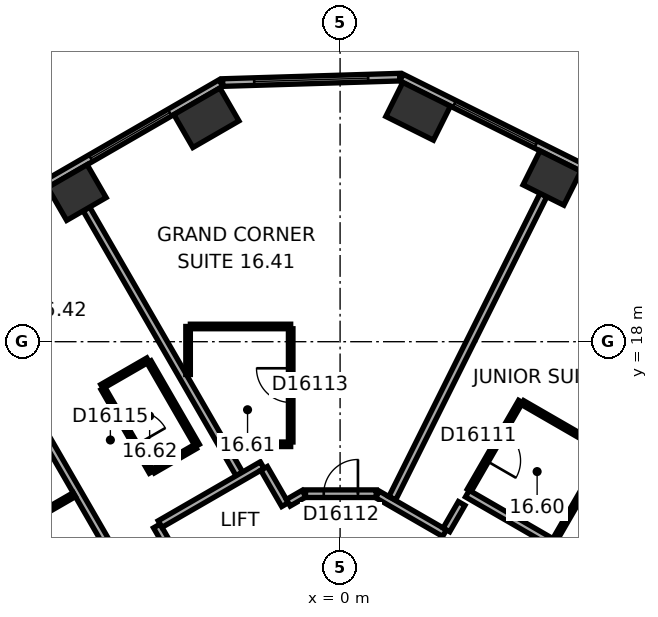
"""IFC4 building model, lengths in metres.
Left out: names, types, materials, properties, quantities, classifications, styles, units other than length and angle.
Written with IfcOpenShell. Run it as: python <this file> out.ifc"""

import sys

from ifc_helpers import new_model, si_unit, direction, frame, frame_2d, origin, origin_2d, place, context, subcontext, project, spatial, rectangle, extrude, element, fill, save


model = new_model("IFC4")
c1 = context("Model", 3, precision=1e-05, world=origin(), true_north=direction((0.0, 1.0)))
c2 = subcontext(c1, "Body", "Model", "MODEL_VIEW")
j1 = project(units=[si_unit("LENGTHUNIT", "METRE"), si_unit("PLANEANGLEUNIT", "RADIAN")], contexts=[c1])
p1 = place(None, origin())
s1 = spatial("IfcSite", under=j1, at=p1, CompositionType="ELEMENT")
p2 = place(p1, origin())
s2 = spatial("IfcBuilding", under=s1, at=p2, CompositionType="ELEMENT")
p3 = place(p2, frame((0.0, 0.0, 73.7)))
s3 = spatial("IfcBuildingStorey", under=s2, at=p3, CompositionType="ELEMENT", Elevation=73.7)
p4 = place(p3, frame((5.574, 22.306, 0.0), z_axis=(0.0, 0.0, 1.0), x_axis=(-0.894934361602, 0.44619781311, 0.0)))
e1 = element("IfcColumn", 1, at=p4, inside=s3, PredefinedType="COLUMN", context=c2, shape_type="SweptSolid", body=[
    extrude(rectangle(XDim=1.2, YDim=1.0, at=origin_2d()), origin(), (0.0, 0.0, 1.0), 3.3),
])
for number, where, z_axis, x_axis in (
    (2, (2.053, 24.062, 0.0), (0.0, 0.0, 1.0), (-0.895, 0.446, 0.0)),
    (3, (-3.518, 23.892, 0.0), (0.0, 0.0, 1.0), (-0.866, -0.5, 0.0)),
):
    element("IfcColumn", number, at=place(p3, frame(where, z_axis=z_axis, x_axis=x_axis)), inside=s3, PredefinedType="COLUMN", context=c2, shape_type="SweptSolid", body=[
        extrude(rectangle(XDim=1.4, YDim=1.0, at=origin_2d()), origin(), (0.0, 0.0, 1.0), 3.3),
    ])
p5 = place(p3, frame((-6.926, 21.925, 0.0), z_axis=(0.0, 0.0, 1.0), x_axis=(-0.866025403784, -0.5, 0.0)))
e4 = element("IfcColumn", 4, at=p5, inside=s3, PredefinedType="COLUMN", context=c2, shape_type="SweptSolid", body=[
    extrude(rectangle(XDim=1.2, YDim=1.0, at=origin_2d()), origin(), (0.0, 0.0, 1.0), 3.3),
])
p6 = place(p3, frame((20.63, 15.47, 0.0), z_axis=(0.0, 0.0, 1.0), x_axis=(-0.894934518609, 0.446197498203, 0.0)))
e5 = element("IfcWall", 5, at=p6, inside=s3, PredefinedType="STANDARD", context=c2, shape_type="SweptSolid", body=[
    extrude(rectangle(XDim=21.246, YDim=0.2, at=frame_2d((10.623, 0.0))), origin(), (0.0, 0.0, 1.0), 3.3),
])
p7 = place(p6, frame((1.553, 0.0, 0.8)))
e6 = element("IfcOpeningElement", 6, at=p7, cuts=e5, PredefinedType="OPENING", context=c2, shape_type="SweptSolid", body=[
    extrude(rectangle(XDim=2.4, YDim=1.7, at=frame_2d((1.2, 0.85))), frame((0.0, 0.11, 0.0), z_axis=(0.0, -1.0, 0.0), x_axis=(1.0, 0.0, 0.0)), (0.0, 0.0, 1.0), 0.22),
])
p8 = place(p6, frame((5.488, 0.0, 0.8)))
e7 = element("IfcOpeningElement", 7, at=p8, cuts=e5, PredefinedType="OPENING", context=c2, shape_type="SweptSolid", body=[
    extrude(rectangle(XDim=2.4, YDim=1.7, at=frame_2d((1.2, 0.85))), frame((0.0, 0.11, 0.0), z_axis=(0.0, -1.0, 0.0), x_axis=(1.0, 0.0, 0.0)), (0.0, 0.0, 1.0), 0.22),
])
p9 = place(p6, frame((9.422, 0.0, 0.8)))
e8 = element("IfcOpeningElement", 8, at=p9, cuts=e5, PredefinedType="OPENING", context=c2, shape_type="SweptSolid", body=[
    extrude(rectangle(XDim=2.4, YDim=1.7, at=frame_2d((1.2, 0.85))), frame((0.0, 0.11, 0.0), z_axis=(0.0, -1.0, 0.0), x_axis=(1.0, 0.0, 0.0)), (0.0, 0.0, 1.0), 0.22),
])
p10 = place(p6, frame((13.357, 0.0, 0.8)))
e9 = element("IfcOpeningElement", 9, at=p10, cuts=e5, PredefinedType="OPENING", context=c2, shape_type="SweptSolid", body=[
    extrude(rectangle(XDim=2.4, YDim=1.7, at=frame_2d((1.2, 0.85))), frame((0.0, 0.11, 0.0), z_axis=(0.0, -1.0, 0.0), x_axis=(1.0, 0.0, 0.0)), (0.0, 0.0, 1.0), 0.22),
])
p11 = place(p6, frame((17.292, 0.0, 0.8)))
e10 = element("IfcOpeningElement", 10, at=p11, cuts=e5, PredefinedType="OPENING", context=c2, shape_type="SweptSolid", body=[
    extrude(rectangle(XDim=2.4, YDim=1.7, at=frame_2d((1.2, 0.85))), frame((0.0, 0.11, 0.0), z_axis=(0.0, -1.0, 0.0), x_axis=(1.0, 0.0, 0.0)), (0.0, 0.0, 1.0), 0.22),
])
p12 = place(p3, frame((1.568, 24.961, 0.0), z_axis=(0.0, 0.0, 1.0), x_axis=(-0.999533359013, -0.030546099927, 0.0)))
e11 = element("IfcWall", 11, at=p12, inside=s3, PredefinedType="STANDARD", context=c2, shape_type="SweptSolid", body=[
    extrude(rectangle(XDim=4.66, YDim=0.2, at=frame_2d((2.33, 0.0))), origin(), (0.0, 0.0, 1.0), 3.3),
])
p13 = place(p12, frame((0.83, 0.0, 0.8)))
e12 = element("IfcOpeningElement", 12, at=p13, cuts=e11, PredefinedType="OPENING", context=c2, shape_type="SweptSolid", body=[
    extrude(rectangle(XDim=3.0, YDim=1.7, at=frame_2d((1.5, 0.85))), frame((0.0, 0.11, 0.0), z_axis=(0.0, -1.0, 0.0), x_axis=(1.0, 0.0, 0.0)), (0.0, 0.0, 1.0), 0.22),
])
p14 = place(p3, frame((-3.136, 24.805, 0.0), z_axis=(0.0, 0.0, 1.0), x_axis=(-0.866028291626, -0.499994998079, 0.0)))
e13 = element("IfcWall", 13, at=p14, inside=s3, PredefinedType="STANDARD", context=c2, shape_type="SweptSolid", body=[
    extrude(rectangle(XDim=21.246, YDim=0.2, at=frame_2d((10.623, 0.0))), origin(), (0.0, 0.0, 1.0), 3.3),
])
p15 = place(p14, frame((1.555, 0.0, 0.8)))
e14 = element("IfcOpeningElement", 14, at=p15, cuts=e13, PredefinedType="OPENING", context=c2, shape_type="SweptSolid", body=[
    extrude(rectangle(XDim=2.4, YDim=1.7, at=frame_2d((1.2, 0.85))), frame((0.0, 0.11, 0.0), z_axis=(0.0, -1.0, 0.0), x_axis=(1.0, 0.0, 0.0)), (0.0, 0.0, 1.0), 0.22),
])
p16 = place(p14, frame((5.489, 0.0, 0.8)))
e15 = element("IfcOpeningElement", 15, at=p16, cuts=e13, PredefinedType="OPENING", context=c2, shape_type="SweptSolid", body=[
    extrude(rectangle(XDim=2.4, YDim=1.7, at=frame_2d((1.2, 0.85))), frame((0.0, 0.11, 0.0), z_axis=(0.0, -1.0, 0.0), x_axis=(1.0, 0.0, 0.0)), (0.0, 0.0, 1.0), 0.22),
])
p17 = place(p14, frame((9.424, 0.0, 0.8)))
e16 = element("IfcOpeningElement", 16, at=p17, cuts=e13, PredefinedType="OPENING", context=c2, shape_type="SweptSolid", body=[
    extrude(rectangle(XDim=2.4, YDim=1.7, at=frame_2d((1.2, 0.85))), frame((0.0, 0.11, 0.0), z_axis=(0.0, -1.0, 0.0), x_axis=(1.0, 0.0, 0.0)), (0.0, 0.0, 1.0), 0.22),
])
p18 = place(p14, frame((13.358, 0.0, 0.8)))
e17 = element("IfcOpeningElement", 17, at=p18, cuts=e13, PredefinedType="OPENING", context=c2, shape_type="SweptSolid", body=[
    extrude(rectangle(XDim=2.4, YDim=1.7, at=frame_2d((1.2, 0.85))), frame((0.0, 0.11, 0.0), z_axis=(0.0, -1.0, 0.0), x_axis=(1.0, 0.0, 0.0)), (0.0, 0.0, 1.0), 0.22),
])
p19 = place(p14, frame((17.293, 0.0, 0.8)))
e18 = element("IfcOpeningElement", 18, at=p19, cuts=e13, PredefinedType="OPENING", context=c2, shape_type="SweptSolid", body=[
    extrude(rectangle(XDim=2.4, YDim=1.7, at=frame_2d((1.2, 0.85))), frame((0.0, 0.11, 0.0), z_axis=(0.0, -1.0, 0.0), x_axis=(1.0, 0.0, 0.0)), (0.0, 0.0, 1.0), 0.22),
])
p20 = place(p3, frame((-10.083, 19.524, 0.0), z_axis=(0.0, 0.0, 1.0), x_axis=(0.499999662836, -0.866025598446, 0.0)))
e19 = element("IfcWall", 19, at=p20, inside=s3, PredefinedType="PARTITIONING", context=c2, shape_type="SweptSolid", body=[
    extrude(rectangle(XDim=9.25, YDim=0.2, at=frame_2d((4.625, 0.0))), origin(), (0.0, 0.0, 1.0), 2.15),
])
p21 = place(p3, frame((-9.016, 12.808, 0.0), z_axis=(0.0, 0.0, 1.0), x_axis=(0.86600796803, 0.500030198396, 0.0)))
e20 = element("IfcWall", 20, at=p21, inside=s3, PredefinedType="PARTITIONING", context=c2, shape_type="SweptSolid", body=[
    extrude(rectangle(XDim=2.335, YDim=0.12, at=frame_2d((1.167, 0.0))), origin(), (0.0, 0.0, 1.0), 2.95),
])
p22 = place(p3, frame((-6.676, 21.492, 0.0), z_axis=(0.0, 0.0, 1.0), x_axis=(0.500011263043, -0.866018900966, 0.0)))
e21 = element("IfcWall", 21, at=p22, inside=s3, PredefinedType="PARTITIONING", context=c2, shape_type="SweptSolid", body=[
    extrude(rectangle(XDim=8.049, YDim=0.2, at=frame_2d((4.024, 0.0))), origin(), (0.0, 0.0, 1.0), 2.95),
])
p23 = place(p3, frame((-6.268, 16.82, 0.0), z_axis=(0.0, 0.0, 1.0), x_axis=(0.866002662425, 0.500039387122, 0.0)))
e22 = element("IfcWall", 22, at=p23, inside=s3, PredefinedType="PARTITIONING", context=c2, shape_type="SweptSolid", body=[
    extrude(rectangle(XDim=1.4, YDim=0.12, at=frame_2d((0.7, 0.0))), origin(), (0.0, 0.0, 1.0), 2.95),
])
p24 = place(p3, frame((-5.026, 17.469, 0.0), z_axis=(0.0, 0.0, 1.0), x_axis=(0.500005339912, -0.866022320763, 0.0)))
e23 = element("IfcWall", 23, at=p24, inside=s3, PredefinedType="PARTITIONING", context=c2, shape_type="SweptSolid", body=[
    extrude(rectangle(XDim=2.54, YDim=0.12, at=frame_2d((1.27, 0.0))), origin(), (0.0, 0.0, 1.0), 2.95),
])
p25 = place(p3, frame((-4.968, 14.569, 0.0), z_axis=(0.0, 0.0, 1.0), x_axis=(-0.500046963369, 0.865998287773, 0.0)))
e24 = element("IfcWall", 24, at=p25, inside=s3, PredefinedType="PARTITIONING", context=c2, shape_type="SweptSolid", body=[
    extrude(rectangle(XDim=2.54, YDim=0.12, at=frame_2d((1.27, 0.0))), origin(), (0.0, 0.0, 1.0), 2.95),
])
p26 = place(p25, frame((0.82, 0.0, 0.0)))
e25 = element("IfcOpeningElement", 25, at=p26, cuts=e24, PredefinedType="OPENING", context=c2, shape_type="SweptSolid", body=[
    extrude(rectangle(XDim=0.9, YDim=2.1, at=frame_2d((0.45, 1.05))), frame((0.0, 0.07, 0.0), z_axis=(0.0, -1.0, 0.0), x_axis=(1.0, 0.0, 0.0)), (0.0, 0.0, 1.0), 0.14),
])
p27 = place(p3, frame((-4.823, 13.152, 0.0), z_axis=(0.0, 0.0, 1.0), x_axis=(0.499986357472, -0.866033280158, 0.0)))
e26 = element("IfcWall", 26, at=p27, inside=s3, PredefinedType="PARTITIONING", context=c2, shape_type="SweptSolid", body=[
    extrude(rectangle(XDim=1.201, YDim=0.2, at=frame_2d((0.601, 0.0))), origin(), (0.0, 0.0, 1.0), 2.95),
])
p28 = place(p3, frame((-4.0, 17.137, 0.0), z_axis=(0.0, 0.0, 1.0), x_axis=(0.0, 1.0, 0.0)))
e27 = element("IfcWall", 27, at=p28, inside=s3, PredefinedType="PARTITIONING", context=c2, shape_type="SweptSolid", body=[
    extrude(rectangle(XDim=1.263, YDim=0.12, at=frame_2d((0.632, 0.0))), origin(), (0.0, 0.0, 1.0), 2.95),
])
p29 = place(p3, frame((-3.94, 18.401, 0.0), z_axis=(0.0, 0.0, 1.0), x_axis=(1.0, 0.0, 0.0)))
e28 = element("IfcWall", 28, at=p29, inside=s3, PredefinedType="PARTITIONING", context=c2, shape_type="SweptSolid", body=[
    extrude(rectangle(XDim=2.64, YDim=0.12, at=frame_2d((1.32, 0.0))), origin(), (0.0, 0.0, 1.0), 2.95),
])
p30 = place(p3, frame((-3.808, 15.239, 0.0), z_axis=(0.0, 0.0, 1.0), x_axis=(-0.866087136806, -0.499893060024, 0.0)))
e29 = element("IfcWall", 29, at=p30, inside=s3, PredefinedType="PARTITIONING", context=c2, shape_type="SweptSolid", body=[
    extrude(rectangle(XDim=1.28, YDim=0.12, at=frame_2d((0.64, 0.0))), origin(), (0.0, 0.0, 1.0), 2.95),
])
p31 = place(p3, frame((-2.05, 14.752, 0.0), z_axis=(0.0, 0.0, 1.0), x_axis=(-0.866030936828, -0.499990416364, 0.0)))
e30 = element("IfcWall", 30, at=p31, inside=s3, PredefinedType="PARTITIONING", context=c2, shape_type="SweptSolid", body=[
    extrude(rectangle(XDim=3.102, YDim=0.2, at=frame_2d((1.551, 0.0))), origin(), (0.0, 0.0, 1.0), 2.95),
])
p32 = place(p3, frame((-1.449, 13.712, 0.0), z_axis=(0.0, 0.0, 1.0), x_axis=(-0.499978356969, 0.866037899034, 0.0)))
e31 = element("IfcWall", 31, at=p32, inside=s3, PredefinedType="PARTITIONING", context=c2, shape_type="SweptSolid", body=[
    extrude(rectangle(XDim=1.101, YDim=0.2, at=frame_2d((0.551, 0.0))), origin(), (0.0, 0.0, 1.0), 2.95),
])
p33 = place(p3, frame((-1.3, 15.301, 0.0), z_axis=(0.0, 0.0, 1.0), x_axis=(-1.0, 0.0, 0.0)))
e32 = element("IfcWall", 32, at=p33, inside=s3, PredefinedType="PARTITIONING", context=c2, shape_type="SweptSolid", body=[
    extrude(rectangle(XDim=1.661, YDim=0.12, at=frame_2d((0.831, 0.0))), origin(), (0.0, 0.0, 1.0), 2.95),
])
p34 = place(p3, frame((-1.3, 18.341, 0.0), z_axis=(0.0, 0.0, 1.0), x_axis=(0.0, -1.0, 0.0)))
e33 = element("IfcWall", 33, at=p34, inside=s3, PredefinedType="PARTITIONING", context=c2, shape_type="SweptSolid", body=[
    extrude(rectangle(XDim=2.98, YDim=0.12, at=frame_2d((1.49, 0.0))), origin(), (0.0, 0.0, 1.0), 2.95),
])
p35 = place(p34, frame((1.04, 0.0, 0.0)))
e34 = element("IfcOpeningElement", 34, at=p35, cuts=e33, PredefinedType="OPENING", context=c2, shape_type="SweptSolid", body=[
    extrude(rectangle(XDim=0.9, YDim=2.1, at=frame_2d((0.45, 1.05))), frame((0.0, 0.07, 0.0), z_axis=(0.0, -1.0, 0.0), x_axis=(1.0, 0.0, 0.0)), (0.0, 0.0, 1.0), 0.14),
])
p36 = place(p3, frame((-0.95, 14.001, 0.0), z_axis=(0.0, 0.0, 1.0), x_axis=(-0.86609177584, -0.499885022602, 0.0)))
e35 = element("IfcWall", 35, at=p36, inside=s3, PredefinedType="PARTITIONING", context=c2, shape_type="SweptSolid", body=[
    extrude(rectangle(XDim=0.477, YDim=0.2, at=frame_2d((0.238, 0.0))), origin(), (0.0, 0.0, 1.0), 2.95),
])
p37 = place(p3, frame((0.95, 14.001, 0.0), z_axis=(0.0, 0.0, 1.0), x_axis=(-1.0, 0.0, 0.0)))
e36 = element("IfcWall", 36, at=p37, inside=s3, PredefinedType="PARTITIONING", context=c2, shape_type="SweptSolid", body=[
    extrude(rectangle(XDim=1.86, YDim=0.2, at=frame_2d((0.93, 0.0))), origin(), (0.0, 0.0, 1.0), 2.95),
])
p38 = place(p37, frame((0.48, 0.0, 0.0)))
e37 = element("IfcOpeningElement", 37, at=p38, cuts=e36, PredefinedType="OPENING", context=c2, shape_type="SweptSolid", body=[
    extrude(rectangle(XDim=0.9, YDim=2.1, at=frame_2d((0.45, 1.05))), frame((0.0, 0.11, 0.0), z_axis=(0.0, -1.0, 0.0), x_axis=(1.0, 0.0, 0.0)), (0.0, 0.0, 1.0), 0.22),
])
p39 = place(p3, frame((2.748, 12.962, 0.0), z_axis=(0.0, 0.0, 1.0), x_axis=(-0.866013897511, 0.50001992892, 0.0)))
e38 = element("IfcWall", 38, at=p39, inside=s3, PredefinedType="PARTITIONING", context=c2, shape_type="SweptSolid", body=[
    extrude(rectangle(XDim=2.037, YDim=0.2, at=frame_2d((1.018, 0.0))), origin(), (0.0, 0.0, 1.0), 2.95),
])
p40 = place(p3, frame((3.199, 13.743, 0.0), z_axis=(0.0, 0.0, 1.0), x_axis=(-0.500170954823, -0.865926680471, 0.0)))
e39 = element("IfcWall", 39, at=p40, inside=s3, PredefinedType="PARTITIONING", context=c2, shape_type="SweptSolid", body=[
    extrude(rectangle(XDim=0.801, YDim=0.2, at=frame_2d((0.4, 0.0))), origin(), (0.0, 0.0, 1.0), 2.95),
])
p41 = place(p3, frame((3.399, 14.089, 0.0), z_axis=(0.0, 0.0, 1.0), x_axis=(0.4999416173, 0.866059108428, 0.0)))
e40 = element("IfcWall", 40, at=p41, inside=s3, PredefinedType="PARTITIONING", context=c2, shape_type="SweptSolid", body=[
    extrude(rectangle(XDim=2.7, YDim=0.12, at=frame_2d((1.35, 0.0))), origin(), (0.0, 0.0, 1.0), 2.95),
])
p42 = place(p41, frame((0.9, 0.0, 0.0)))
e41 = element("IfcOpeningElement", 41, at=p42, cuts=e40, PredefinedType="OPENING", context=c2, shape_type="SweptSolid", body=[
    extrude(rectangle(XDim=0.9, YDim=2.1, at=frame_2d((0.45, 1.05))), frame((0.0, 0.07, 0.0), z_axis=(0.0, -1.0, 0.0), x_axis=(1.0, 0.0, 0.0)), (0.0, 0.0, 1.0), 0.14),
])
p43 = place(p3, frame((4.801, 16.397, 0.0), z_axis=(0.0, 0.0, 1.0), x_axis=(0.866022320763, -0.500005339912, 0.0)))
e42 = element("IfcWall", 42, at=p43, inside=s3, PredefinedType="PARTITIONING", context=c2, shape_type="SweptSolid", body=[
    extrude(rectangle(XDim=2.54, YDim=0.12, at=frame_2d((1.27, 0.0))), origin(), (0.0, 0.0, 1.0), 2.95),
])
p44 = place(p3, frame((5.351, 21.859, 0.0), z_axis=(0.0, 0.0, 1.0), x_axis=(-0.446205309328, -0.894930624086, 0.0)))
e43 = element("IfcWall", 43, at=p44, inside=s3, PredefinedType="PARTITIONING", context=c2, shape_type="SweptSolid", body=[
    extrude(rectangle(XDim=8.913, YDim=0.2, at=frame_2d((4.457, 0.0))), origin(), (0.0, 0.0, 1.0), 2.15),
])
p45 = place(p3, frame((6.971, 15.075, 0.0), z_axis=(0.0, 0.0, 1.0), x_axis=(-0.500007957085, -0.86602080971, 0.0)))
e44 = element("IfcWall", 44, at=p45, inside=s3, PredefinedType="PARTITIONING", context=c2, shape_type="SweptSolid", body=[
    extrude(rectangle(XDim=2.64, YDim=0.12, at=frame_2d((1.32, 0.0))), origin(), (0.0, 0.0, 1.0), 2.95),
])
p46 = place(p3, frame((10.885, 9.652, 0.0), z_axis=(0.0, 0.0, 1.0), x_axis=(-0.866033277307, 0.499986362411, 0.0)))
e45 = element("IfcWall", 45, at=p46, inside=s3, PredefinedType="PARTITIONING", context=c2, shape_type="SweptSolid", body=[
    extrude(rectangle(XDim=8.702, YDim=0.2, at=frame_2d((4.351, 0.0))), origin(), (0.0, 0.0, 1.0), 2.95),
])
p47 = place(p46, frame((3.844, 0.0, 0.0)))
e46 = element("IfcOpeningElement", 46, at=p47, cuts=e45, PredefinedType="OPENING", context=c2, shape_type="SweptSolid", body=[
    extrude(rectangle(XDim=0.9, YDim=2.1, at=frame_2d((0.45, 1.05))), frame((0.0, 0.11, 0.0), z_axis=(0.0, -1.0, 0.0), x_axis=(1.0, 0.0, 0.0)), (0.0, 0.0, 1.0), 0.22),
])
p48 = place(p11, origin())
e47 = element("IfcWindow", 47, at=p48, inside=s3, PartitioningType="SINGLE_PANEL", PredefinedType="WINDOW", context=c2, shape_type="SweptSolid", body=[
    extrude(rectangle(XDim=2.4, YDim=1.7, at=frame_2d((1.2, 0.85))), frame((0.0, 0.03, 0.0), z_axis=(0.0, -1.0, 0.0), x_axis=(1.0, 0.0, 0.0)), (0.0, 0.0, 1.0), 0.06),
])
fill(e10, e47)
p49 = place(p13, origin())
e48 = element("IfcWindow", 48, at=p49, inside=s3, PartitioningType="SINGLE_PANEL", PredefinedType="WINDOW", context=c2, shape_type="SweptSolid", body=[
    extrude(rectangle(XDim=3.0, YDim=1.7, at=frame_2d((1.5, 0.85))), frame((0.0, 0.03, 0.0), z_axis=(0.0, -1.0, 0.0), x_axis=(1.0, 0.0, 0.0)), (0.0, 0.0, 1.0), 0.06),
])
fill(e12, e48)
p50 = place(p15, origin())
e49 = element("IfcWindow", 49, at=p50, inside=s3, PartitioningType="SINGLE_PANEL", PredefinedType="WINDOW", context=c2, shape_type="SweptSolid", body=[
    extrude(rectangle(XDim=2.4, YDim=1.7, at=frame_2d((1.2, 0.85))), frame((0.0, 0.03, 0.0), z_axis=(0.0, -1.0, 0.0), x_axis=(1.0, 0.0, 0.0)), (0.0, 0.0, 1.0), 0.06),
])
fill(e14, e49)
p51 = place(p42, origin())
e50 = element("IfcDoor", 50, at=p51, inside=s3, OperationType="SINGLE_SWING_LEFT", PredefinedType="DOOR", context=c2, shape_type="SweptSolid", body=[
    extrude(rectangle(XDim=0.9, YDim=2.1, at=frame_2d((0.45, 1.05))), frame((0.0, 0.025, 0.0), z_axis=(0.0, -1.0, 0.0), x_axis=(1.0, 0.0, 0.0)), (0.0, 0.0, 1.0), 0.05),
])
fill(e41, e50)
p52 = place(p38, origin())
e51 = element("IfcDoor", 51, at=p52, inside=s3, OperationType="SINGLE_SWING_LEFT", PredefinedType="DOOR", context=c2, shape_type="SweptSolid", body=[
    extrude(rectangle(XDim=0.9, YDim=2.1, at=frame_2d((0.45, 1.05))), frame((0.0, 0.025, 0.0), z_axis=(0.0, -1.0, 0.0), x_axis=(1.0, 0.0, 0.0)), (0.0, 0.0, 1.0), 0.05),
])
fill(e37, e51)
p53 = place(p35, origin())
e52 = element("IfcDoor", 52, at=p53, inside=s3, OperationType="SINGLE_SWING_LEFT", PredefinedType="DOOR", context=c2, shape_type="SweptSolid", body=[
    extrude(rectangle(XDim=0.9, YDim=2.1, at=frame_2d((0.45, 1.05))), frame((0.0, 0.025, 0.0), z_axis=(0.0, -1.0, 0.0), x_axis=(1.0, 0.0, 0.0)), (0.0, 0.0, 1.0), 0.05),
])
fill(e34, e52)
p54 = place(p26, origin())
e53 = element("IfcDoor", 53, at=p54, inside=s3, OperationType="SINGLE_SWING_LEFT", PredefinedType="DOOR", context=c2, shape_type="SweptSolid", body=[
    extrude(rectangle(XDim=0.9, YDim=2.1, at=frame_2d((0.45, 1.05))), frame((0.0, 0.025, 0.0), z_axis=(0.0, -1.0, 0.0), x_axis=(1.0, 0.0, 0.0)), (0.0, 0.0, 1.0), 0.05),
])
fill(e25, e53)
save(model, sys.argv[1])
